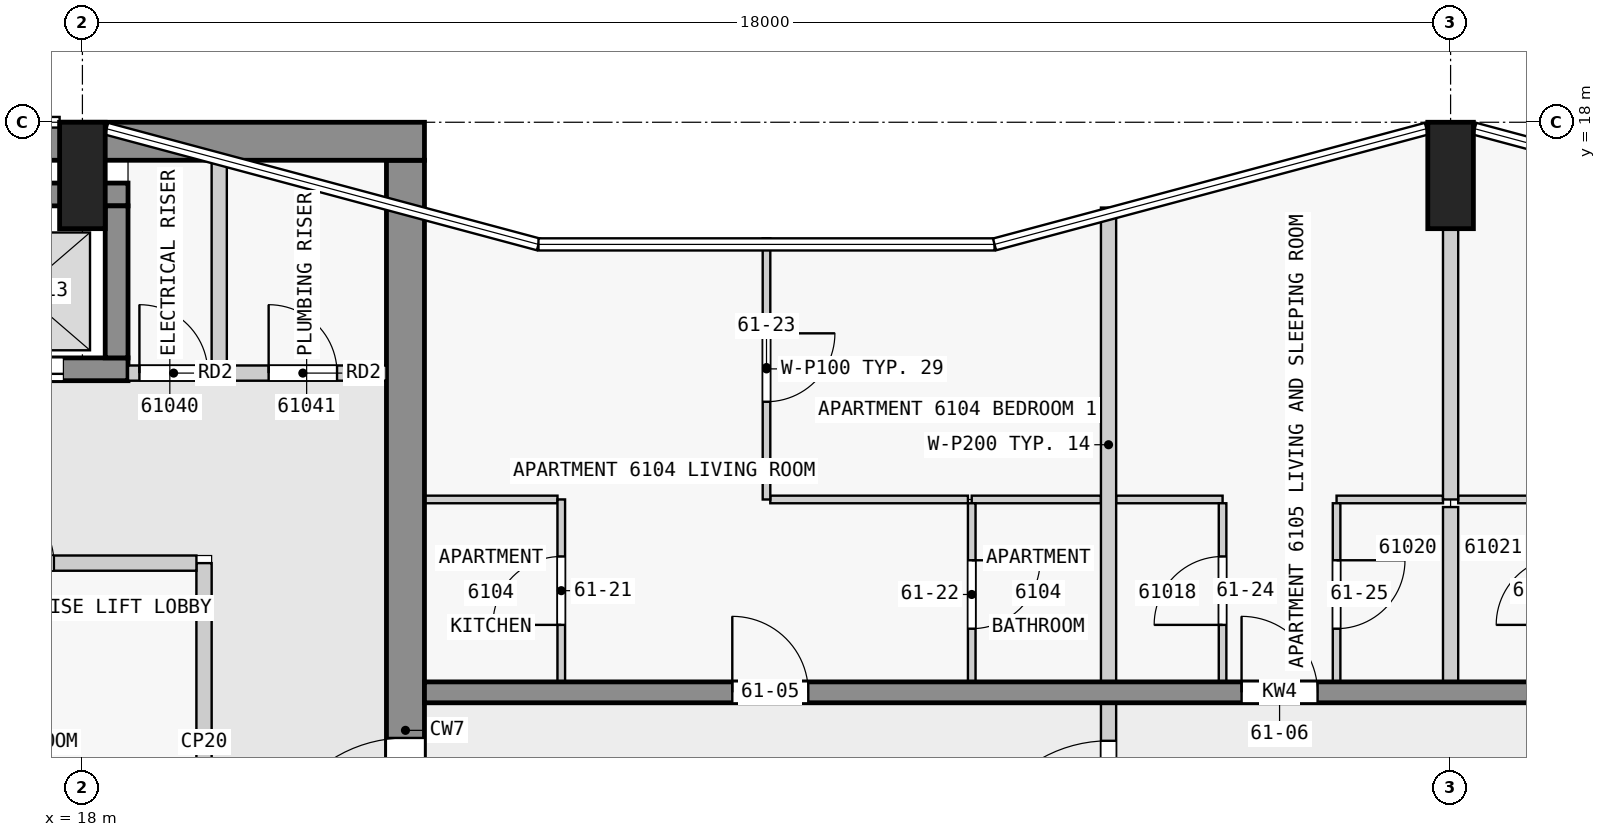
"""IFC4 building model, lengths in metres.
Left out: names, types, materials, properties, quantities, classifications, styles, units other than length and angle.
Written with IfcOpenShell. Run it as: python <this file> out.ifc"""

import sys

from ifc_helpers import new_model, si_unit, direction, frame, frame_2d, origin, origin_2d, place, context, subcontext, project, spatial, rectangle, extrude, element, fill, save


model = new_model("IFC4")
c1 = context("Model", 3, precision=1e-05, world=origin(), true_north=direction((0.0, 1.0)))
c2 = subcontext(c1, "Body", "Model", "MODEL_VIEW")
j1 = project(units=[si_unit("LENGTHUNIT", "METRE"), si_unit("PLANEANGLEUNIT", "RADIAN")], contexts=[c1])
p1 = place(None, origin())
s1 = spatial("IfcSite", under=j1, at=p1, CompositionType="ELEMENT")
p2 = place(p1, origin())
s2 = spatial("IfcBuilding", under=s1, at=p2, CompositionType="ELEMENT")
p3 = place(p2, frame((0.0, 0.0, 232.9)))
s3 = spatial("IfcBuildingStorey", under=s2, at=p3, CompositionType="ELEMENT", Elevation=232.9)
for number, where, z_axis, x_axis in (
    (1, (36.0, 17.3, 0.0), (0.0, 0.0, 1.0), (1.0, 0.0, 0.0)),
    (2, (18.0, 17.3, 0.0), (0.0, 0.0, 1.0), (1.0, 0.0, 0.0)),
):
    element("IfcColumn", number, at=place(p3, frame(where, z_axis=z_axis, x_axis=x_axis)), inside=s3, PredefinedType="COLUMN", context=c2, shape_type="SweptSolid", body=[
        extrude(rectangle(XDim=0.6, YDim=1.4, at=origin_2d()), origin(), (0.0, 0.0, 1.0), 3.5),
    ])
p4 = place(p3, frame((1.8, 17.75, 0.0), z_axis=(0.0, 0.0, 1.0), x_axis=(1.0, 0.0, 0.0)))
e3 = element("IfcWall", 3, at=p4, inside=s3, PredefinedType="SHEAR", context=c2, shape_type="SweptSolid", body=[
    extrude(rectangle(XDim=20.7, YDim=0.5, at=frame_2d((10.35, 0.0))), origin(), (0.0, 0.0, 1.0), 3.2),
])
p5 = place(p3, frame((22.25, 2.5, 0.0), z_axis=(0.0, 0.0, 1.0), x_axis=(0.0, 1.0, 0.0)))
e4 = element("IfcWall", 4, at=p5, inside=s3, PredefinedType="SHEAR", context=c2, shape_type="SweptSolid", body=[
    extrude(rectangle(XDim=15.0, YDim=0.5, at=frame_2d((7.5, 0.0))), origin(), (0.0, 0.0, 1.0), 3.2),
])
p6 = place(p5, frame((5.6, 0.0, 0.0)))
e5 = element("IfcOpeningElement", 5, at=p6, cuts=e4, PredefinedType="OPENING", context=c2, shape_type="SweptSolid", body=[
    extrude(rectangle(XDim=1.8, YDim=2.1, at=frame_2d((0.9, 1.05))), frame((0.0, 0.26, 0.0), z_axis=(0.0, -1.0, 0.0), x_axis=(1.0, 0.0, 0.0)), (0.0, 0.0, 1.0), 0.52),
])
p7 = place(p3, frame((10.8, 17.05, 0.0), z_axis=(0.0, 0.0, 1.0), x_axis=(1.0, 0.0, 0.0)))
e6 = element("IfcWall", 6, at=p7, inside=s3, PredefinedType="SHEAR", context=c2, shape_type="SweptSolid", body=[
    extrude(rectangle(XDim=7.8, YDim=0.3, at=frame_2d((3.9, 0.0))), origin(), (0.0, 0.0, 1.0), 3.2),
])
p8 = place(p3, frame((10.8, 14.75, 0.0), z_axis=(0.0, 0.0, 1.0), x_axis=(1.0, 0.0, 0.0)))
e7 = element("IfcWall", 7, at=p8, inside=s3, PredefinedType="SHEAR", context=c2, shape_type="SweptSolid", body=[
    extrude(rectangle(XDim=7.8, YDim=0.3, at=frame_2d((3.9, 0.0))), origin(), (0.0, 0.0, 1.0), 3.2),
])
p9 = place(p8, frame((0.85, 0.0, 0.0)))
e8 = element("IfcOpeningElement", 8, at=p9, cuts=e7, PredefinedType="OPENING", context=c2, shape_type="SweptSolid", body=[
    extrude(rectangle(XDim=1.1, YDim=2.1, at=frame_2d((0.55, 1.05))), frame((0.0, 0.16, 0.0), z_axis=(0.0, -1.0, 0.0), x_axis=(1.0, 0.0, 0.0)), (0.0, 0.0, 1.0), 0.32),
])
p10 = place(p8, frame((3.35, 0.0, 0.0)))
e9 = element("IfcOpeningElement", 9, at=p10, cuts=e7, PredefinedType="OPENING", context=c2, shape_type="SweptSolid", body=[
    extrude(rectangle(XDim=1.1, YDim=2.1, at=frame_2d((0.55, 1.05))), frame((0.0, 0.16, 0.0), z_axis=(0.0, -1.0, 0.0), x_axis=(1.0, 0.0, 0.0)), (0.0, 0.0, 1.0), 0.32),
])
p11 = place(p8, frame((5.85, 0.0, 0.0)))
e10 = element("IfcOpeningElement", 10, at=p11, cuts=e7, PredefinedType="OPENING", context=c2, shape_type="SweptSolid", body=[
    extrude(rectangle(XDim=1.1, YDim=2.1, at=frame_2d((0.55, 1.05))), frame((0.0, 0.16, 0.0), z_axis=(0.0, -1.0, 0.0), x_axis=(1.0, 0.0, 0.0)), (0.0, 0.0, 1.0), 0.32),
])
p12 = place(p3, frame((18.45, 14.9, 0.0), z_axis=(0.0, 0.0, 1.0), x_axis=(0.0, 1.0, 0.0)))
e11 = element("IfcWall", 11, at=p12, inside=s3, PredefinedType="SHEAR", context=c2, shape_type="SweptSolid", body=[
    extrude(rectangle(XDim=2.0, YDim=0.3, at=frame_2d((1.0, 0.0))), origin(), (0.0, 0.0, 1.0), 3.2),
])
p13 = place(p3, frame((22.5, 10.5, 0.0), z_axis=(0.0, 0.0, 1.0), x_axis=(1.0, 0.0, 0.0)))
e12 = element("IfcWall", 12, at=p13, inside=s3, PredefinedType="SHEAR", context=c2, shape_type="SweptSolid", body=[
    extrude(rectangle(XDim=22.5, YDim=0.275, at=frame_2d((11.25, 0.0))), origin(), (0.0, 0.0, 1.0), 3.2),
])
p14 = place(p13, frame((4.05, 0.0, 0.0)))
e13 = element("IfcOpeningElement", 13, at=p14, cuts=e12, PredefinedType="OPENING", context=c2, shape_type="SweptSolid", body=[
    extrude(rectangle(XDim=1.0, YDim=2.1, at=frame_2d((0.5, 1.05))), frame((0.0, 0.147, 0.0), z_axis=(0.0, -1.0, 0.0), x_axis=(1.0, 0.0, 0.0)), (0.0, 0.0, 1.0), 0.295),
])
p15 = place(p13, frame((10.75, 0.0, 0.0)))
e14 = element("IfcOpeningElement", 14, at=p15, cuts=e12, PredefinedType="OPENING", context=c2, shape_type="SweptSolid", body=[
    extrude(rectangle(XDim=1.0, YDim=2.1, at=frame_2d((0.5, 1.05))), frame((0.0, 0.147, 0.0), z_axis=(0.0, -1.0, 0.0), x_axis=(1.0, 0.0, 0.0)), (0.0, 0.0, 1.0), 0.295),
])
p16 = place(p13, frame((15.25, 0.0, 0.0)))
e15 = element("IfcOpeningElement", 15, at=p16, cuts=e12, PredefinedType="OPENING", context=c2, shape_type="SweptSolid", body=[
    extrude(rectangle(XDim=1.0, YDim=2.1, at=frame_2d((0.5, 1.05))), frame((0.0, 0.147, 0.0), z_axis=(0.0, -1.0, 0.0), x_axis=(1.0, 0.0, 0.0)), (0.0, 0.0, 1.0), 0.295),
])
p17 = place(p13, frame((18.75, 0.0, 0.0)))
e16 = element("IfcOpeningElement", 16, at=p17, cuts=e12, PredefinedType="OPENING", context=c2, shape_type="SweptSolid", body=[
    extrude(rectangle(XDim=0.9, YDim=2.1, at=frame_2d((0.45, 1.05))), frame((0.0, 0.147, 0.0), z_axis=(0.0, -1.0, 0.0), x_axis=(1.0, 0.0, 0.0)), (0.0, 0.0, 1.0), 0.295),
])
p18 = place(p13, frame((20.95, 0.0, 0.0)))
e17 = element("IfcOpeningElement", 17, at=p18, cuts=e12, PredefinedType="OPENING", context=c2, shape_type="SweptSolid", body=[
    extrude(rectangle(XDim=1.0, YDim=2.1, at=frame_2d((0.5, 1.05))), frame((0.0, 0.147, 0.0), z_axis=(0.0, -1.0, 0.0), x_axis=(1.0, 0.0, 0.0)), (0.0, 0.0, 1.0), 0.295),
])
p19 = place(p3, frame((19.6, 7.5, 0.0), z_axis=(0.0, 0.0, 1.0), x_axis=(0.0, 1.0, 0.0)))
e18 = element("IfcWall", 18, at=p19, inside=s3, PredefinedType="PARTITIONING", context=c2, shape_type="SweptSolid", body=[
    extrude(rectangle(XDim=4.7, YDim=0.2, at=frame_2d((2.35, 0.0))), origin(), (0.0, 0.0, 1.0), 3.2),
])
p20 = place(p3, frame((10.9, 12.2, 0.0), z_axis=(0.0, 0.0, 1.0), x_axis=(1.0, 0.0, 0.0)))
e19 = element("IfcWall", 19, at=p20, inside=s3, PredefinedType="PARTITIONING", context=c2, shape_type="SweptSolid", body=[
    extrude(rectangle(XDim=8.6, YDim=0.2, at=frame_2d((4.3, 0.0))), origin(), (0.0, 0.0, 1.0), 3.2),
])
p21 = place(p20, frame((1.425, 0.0, 0.0)))
e20 = element("IfcOpeningElement", 20, at=p21, cuts=e19, PredefinedType="OPENING", context=c2, shape_type="SweptSolid", body=[
    extrude(rectangle(XDim=0.9, YDim=2.1, at=frame_2d((0.45, 1.05))), frame((0.0, 0.11, 0.0), z_axis=(0.0, -1.0, 0.0), x_axis=(1.0, 0.0, 0.0)), (0.0, 0.0, 1.0), 0.22),
])
p22 = place(p20, frame((5.825, 0.0, 0.0)))
e21 = element("IfcOpeningElement", 21, at=p22, cuts=e19, PredefinedType="OPENING", context=c2, shape_type="SweptSolid", body=[
    extrude(rectangle(XDim=0.9, YDim=2.1, at=frame_2d((0.45, 1.05))), frame((0.0, 0.11, 0.0), z_axis=(0.0, -1.0, 0.0), x_axis=(1.0, 0.0, 0.0)), (0.0, 0.0, 1.0), 0.22),
])
p23 = place(p3, frame((18.6, 14.7, 0.0), z_axis=(0.0, 0.0, 1.0), x_axis=(1.0, 0.0, 0.0)))
e22 = element("IfcWall", 22, at=p23, inside=s3, PredefinedType="PARTITIONING", context=c2, shape_type="SweptSolid", body=[
    extrude(rectangle(XDim=3.4, YDim=0.2, at=frame_2d((1.7, 0.0))), origin(), (0.0, 0.0, 1.0), 3.2),
])
p24 = place(p23, frame((0.15, 0.0, 0.0)))
e23 = element("IfcOpeningElement", 23, at=p24, cuts=e22, PredefinedType="OPENING", context=c2, shape_type="SweptSolid", body=[
    extrude(rectangle(XDim=0.9, YDim=2.1, at=frame_2d((0.45, 1.05))), frame((0.0, 0.11, 0.0), z_axis=(0.0, -1.0, 0.0), x_axis=(1.0, 0.0, 0.0)), (0.0, 0.0, 1.0), 0.22),
])
p25 = place(p23, frame((1.85, 0.0, 0.0)))
e24 = element("IfcOpeningElement", 24, at=p25, cuts=e22, PredefinedType="OPENING", context=c2, shape_type="SweptSolid", body=[
    extrude(rectangle(XDim=0.9, YDim=2.1, at=frame_2d((0.45, 1.05))), frame((0.0, 0.11, 0.0), z_axis=(0.0, -1.0, 0.0), x_axis=(1.0, 0.0, 0.0)), (0.0, 0.0, 1.0), 0.22),
])
p26 = place(p3, frame((19.8, 14.8, 0.0), z_axis=(0.0, 0.0, 1.0), x_axis=(0.0, 1.0, 0.0)))
e25 = element("IfcWall", 25, at=p26, inside=s3, PredefinedType="PARTITIONING", context=c2, shape_type="SweptSolid", body=[
    extrude(rectangle(XDim=2.7, YDim=0.2, at=frame_2d((1.35, 0.0))), origin(), (0.0, 0.0, 1.0), 3.2),
])
p27 = place(p3, frame((24.25, 13.038, 0.0), z_axis=(0.0, 0.0, 1.0), x_axis=(-1.0, 0.0, 0.0)))
e26 = element("IfcWall", 26, at=p27, inside=s3, PredefinedType="PARTITIONING", context=c2, shape_type="SweptSolid", body=[
    extrude(rectangle(XDim=1.75, YDim=0.1, at=frame_2d((0.875, 0.0))), origin(), (0.0, 0.0, 1.0), 3.2),
])
p28 = place(p3, frame((31.4, 13.038, 0.0), z_axis=(0.0, 0.0, 1.0), x_axis=(-1.0, 0.0, 0.0)))
e27 = element("IfcWall", 27, at=p28, inside=s3, PredefinedType="PARTITIONING", context=c2, shape_type="SweptSolid", body=[
    extrude(rectangle(XDim=1.7, YDim=0.1, at=frame_2d((0.85, 0.0))), origin(), (0.0, 0.0, 1.0), 3.2),
])
for number, where, z_axis, x_axis in (
    (28, (33.0, 13.038, 0.0), (0.0, 0.0, 1.0), (-1.0, 0.0, 0.0)),
    (29, (35.9, 13.038, 0.0), (0.0, 0.0, 1.0), (-1.0, 0.0, 0.0)),
    (30, (37.5, 13.038, 0.0), (0.0, 0.0, 1.0), (-1.0, 0.0, 0.0)),
):
    element("IfcWall", number, at=place(p3, frame(where, z_axis=z_axis, x_axis=x_axis)), inside=s3, PredefinedType="PARTITIONING", context=c2, shape_type="SweptSolid", body=[
        extrude(rectangle(XDim=1.4, YDim=0.1, at=frame_2d((0.7, 0.0))), origin(), (0.0, 0.0, 1.0), 3.2),
    ])
p29 = place(p3, frame((27.05, 13.038, 0.0), z_axis=(0.0, 0.0, 1.0), x_axis=(1.0, 0.0, 0.0)))
e31 = element("IfcWall", 31, at=p29, inside=s3, PredefinedType="PARTITIONING", context=c2, shape_type="SweptSolid", body=[
    extrude(rectangle(XDim=2.6, YDim=0.1, at=frame_2d((1.3, 0.0))), origin(), (0.0, 0.0, 1.0), 3.2),
])
p30 = place(p3, frame((24.3, 10.637, 0.0), z_axis=(0.0, 0.0, 1.0), x_axis=(0.0, 1.0, 0.0)))
e32 = element("IfcWall", 32, at=p30, inside=s3, PredefinedType="PARTITIONING", context=c2, shape_type="SweptSolid", body=[
    extrude(rectangle(XDim=2.4, YDim=0.1, at=frame_2d((1.2, 0.0))), origin(), (0.0, 0.0, 1.0), 3.2),
])
p31 = place(p30, frame((0.75, 0.0, 0.0)))
e33 = element("IfcOpeningElement", 33, at=p31, cuts=e32, PredefinedType="OPENING", context=c2, shape_type="SweptSolid", body=[
    extrude(rectangle(XDim=0.9, YDim=2.1, at=frame_2d((0.45, 1.05))), frame((0.0, 0.06, 0.0), z_axis=(0.0, -1.0, 0.0), x_axis=(1.0, 0.0, 0.0)), (0.0, 0.0, 1.0), 0.12),
])
p32 = place(p3, frame((27.0, 16.473, 0.0), z_axis=(0.0, 0.0, 1.0), x_axis=(0.0, -1.0, 0.0)))
e34 = element("IfcWall", 34, at=p32, inside=s3, PredefinedType="PARTITIONING", context=c2, shape_type="SweptSolid", body=[
    extrude(rectangle(XDim=3.436, YDim=0.1, at=frame_2d((1.718, 0.0))), origin(), (0.0, 0.0, 1.0), 3.2),
])
p33 = place(p32, frame((1.25, 0.0, 0.0)))
e35 = element("IfcOpeningElement", 35, at=p33, cuts=e34, PredefinedType="OPENING", context=c2, shape_type="SweptSolid", body=[
    extrude(rectangle(XDim=0.9, YDim=2.1, at=frame_2d((0.45, 1.05))), frame((0.0, 0.06, 0.0), z_axis=(0.0, -1.0, 0.0), x_axis=(1.0, 0.0, 0.0)), (0.0, 0.0, 1.0), 0.12),
])
p34 = place(p3, frame((29.7, 12.988, 0.0), z_axis=(0.0, 0.0, 1.0), x_axis=(0.0, -1.0, 0.0)))
e36 = element("IfcWall", 36, at=p34, inside=s3, PredefinedType="PARTITIONING", context=c2, shape_type="SweptSolid", body=[
    extrude(rectangle(XDim=2.35, YDim=0.1, at=frame_2d((1.175, 0.0))), origin(), (0.0, 0.0, 1.0), 3.2),
])
p35 = place(p34, frame((0.75, 0.0, 0.0)))
e37 = element("IfcOpeningElement", 37, at=p35, cuts=e36, PredefinedType="OPENING", context=c2, shape_type="SweptSolid", body=[
    extrude(rectangle(XDim=0.9, YDim=2.1, at=frame_2d((0.45, 1.05))), frame((0.0, 0.06, 0.0), z_axis=(0.0, -1.0, 0.0), x_axis=(1.0, 0.0, 0.0)), (0.0, 0.0, 1.0), 0.12),
])
p36 = place(p3, frame((31.5, 10.637, 0.0), z_axis=(0.0, 0.0, 1.0), x_axis=(0.0, 1.0, 0.0)))
e38 = element("IfcWall", 38, at=p36, inside=s3, PredefinedType="PARTITIONING", context=c2, shape_type="SweptSolid", body=[
    extrude(rectangle(XDim=6.24, YDim=0.2, at=frame_2d((3.12, 0.0))), origin(), (0.0, 0.0, 1.0), 3.2),
])
p37 = place(p3, frame((33.0, 10.637, 0.0), z_axis=(0.0, 0.0, 1.0), x_axis=(0.0, 1.0, 0.0)))
e39 = element("IfcWall", 39, at=p37, inside=s3, PredefinedType="PARTITIONING", context=c2, shape_type="SweptSolid", body=[
    extrude(rectangle(XDim=2.35, YDim=0.1, at=frame_2d((1.175, 0.0))), origin(), (0.0, 0.0, 1.0), 3.2),
])
p38 = place(p37, frame((0.75, 0.0, 0.0)))
e40 = element("IfcOpeningElement", 40, at=p38, cuts=e39, PredefinedType="OPENING", context=c2, shape_type="SweptSolid", body=[
    extrude(rectangle(XDim=0.9, YDim=2.1, at=frame_2d((0.45, 1.05))), frame((0.0, 0.06, 0.0), z_axis=(0.0, -1.0, 0.0), x_axis=(1.0, 0.0, 0.0)), (0.0, 0.0, 1.0), 0.12),
])
p39 = place(p3, frame((34.5, 12.988, 0.0), z_axis=(0.0, 0.0, 1.0), x_axis=(0.0, -1.0, 0.0)))
e41 = element("IfcWall", 41, at=p39, inside=s3, PredefinedType="PARTITIONING", context=c2, shape_type="SweptSolid", body=[
    extrude(rectangle(XDim=2.35, YDim=0.1, at=frame_2d((1.175, 0.0))), origin(), (0.0, 0.0, 1.0), 3.2),
])
p40 = place(p39, frame((0.75, 0.0, 0.0)))
e42 = element("IfcOpeningElement", 42, at=p40, cuts=e41, PredefinedType="OPENING", context=c2, shape_type="SweptSolid", body=[
    extrude(rectangle(XDim=0.9, YDim=2.1, at=frame_2d((0.45, 1.05))), frame((0.0, 0.06, 0.0), z_axis=(0.0, -1.0, 0.0), x_axis=(1.0, 0.0, 0.0)), (0.0, 0.0, 1.0), 0.12),
])
p41 = place(p3, frame((36.0, 16.6, 0.0), z_axis=(0.0, 0.0, 1.0), x_axis=(0.0, -1.0, 0.0)))
e43 = element("IfcWall", 43, at=p41, inside=s3, PredefinedType="PARTITIONING", context=c2, shape_type="SweptSolid", body=[
    extrude(rectangle(XDim=3.562, YDim=0.2, at=frame_2d((1.781, 0.0))), origin(), (0.0, 0.0, 1.0), 3.2),
])
p42 = place(p3, frame((36.0, 10.637, 0.0), z_axis=(0.0, 0.0, 1.0), x_axis=(0.0, 1.0, 0.0)))
e44 = element("IfcWall", 44, at=p42, inside=s3, PredefinedType="PARTITIONING", context=c2, shape_type="SweptSolid", body=[
    extrude(rectangle(XDim=2.3, YDim=0.2, at=frame_2d((1.15, 0.0))), origin(), (0.0, 0.0, 1.0), 3.2),
])
p43 = place(p3, frame((31.5, 7.462, 0.0), z_axis=(0.0, 0.0, 1.0), x_axis=(0.0, 1.0, 0.0)))
e45 = element("IfcWall", 45, at=p43, inside=s3, PredefinedType="PARTITIONING", context=c2, shape_type="SweptSolid", body=[
    extrude(rectangle(XDim=3.075, YDim=0.2, at=frame_2d((1.538, 0.0))), origin(), (0.0, 0.0, 1.0), 3.2),
])
p44 = place(p43, frame((0.6, 0.0, 0.0)))
e46 = element("IfcOpeningElement", 46, at=p44, cuts=e45, PredefinedType="OPENING", context=c2, shape_type="SweptSolid", body=[
    extrude(rectangle(XDim=1.8, YDim=2.1, at=frame_2d((0.9, 1.05))), frame((0.0, 0.11, 0.0), z_axis=(0.0, -1.0, 0.0), x_axis=(1.0, 0.0, 0.0)), (0.0, 0.0, 1.0), 0.22),
])
p45 = place(p22, origin())
e47 = element("IfcDoor", 47, at=p45, inside=s3, OperationType="SINGLE_SWING_LEFT", PredefinedType="DOOR", context=c2, shape_type="SweptSolid", body=[
    extrude(rectangle(XDim=0.9, YDim=2.1, at=frame_2d((0.45, 1.05))), frame((0.0, 0.025, 0.0), z_axis=(0.0, -1.0, 0.0), x_axis=(1.0, 0.0, 0.0)), (0.0, 0.0, 1.0), 0.05),
])
fill(e21, e47)
p46 = place(p11, origin())
e48 = element("IfcDoor", 48, at=p46, inside=s3, OperationType="DOUBLE_DOOR_SLIDING", PredefinedType="DOOR", context=c2, shape_type="SweptSolid", body=[
    extrude(rectangle(XDim=1.1, YDim=2.1, at=frame_2d((0.55, 1.05))), frame((0.0, 0.025, 0.0), z_axis=(0.0, -1.0, 0.0), x_axis=(1.0, 0.0, 0.0)), (0.0, 0.0, 1.0), 0.05),
])
fill(e10, e48)
p47 = place(p6, origin())
e49 = element("IfcDoor", 49, at=p47, inside=s3, OperationType="DOUBLE_DOOR_SINGLE_SWING", PredefinedType="DOOR", context=c2, shape_type="SweptSolid", body=[
    extrude(rectangle(XDim=1.8, YDim=2.1, at=frame_2d((0.9, 1.05))), frame((0.0, 0.025, 0.0), z_axis=(0.0, -1.0, 0.0), x_axis=(1.0, 0.0, 0.0)), (0.0, 0.0, 1.0), 0.05),
])
fill(e5, e49)
p48 = place(p24, origin())
e50 = element("IfcDoor", 50, at=p48, inside=s3, OperationType="SINGLE_SWING_LEFT", PredefinedType="DOOR", context=c2, shape_type="SweptSolid", body=[
    extrude(rectangle(XDim=0.9, YDim=2.1, at=frame_2d((0.45, 1.05))), frame((0.0, 0.025, 0.0), z_axis=(0.0, -1.0, 0.0), x_axis=(1.0, 0.0, 0.0)), (0.0, 0.0, 1.0), 0.05),
])
fill(e23, e50)
p49 = place(p25, origin())
e51 = element("IfcDoor", 51, at=p49, inside=s3, OperationType="SINGLE_SWING_LEFT", PredefinedType="DOOR", context=c2, shape_type="SweptSolid", body=[
    extrude(rectangle(XDim=0.9, YDim=2.1, at=frame_2d((0.45, 1.05))), frame((0.0, 0.025, 0.0), z_axis=(0.0, -1.0, 0.0), x_axis=(1.0, 0.0, 0.0)), (0.0, 0.0, 1.0), 0.05),
])
fill(e24, e51)
p50 = place(p14, origin())
e52 = element("IfcDoor", 52, at=p50, inside=s3, OperationType="SINGLE_SWING_LEFT", PredefinedType="DOOR", context=c2, shape_type="SweptSolid", body=[
    extrude(rectangle(XDim=1.0, YDim=2.1, at=frame_2d((0.5, 1.05))), frame((0.0, 0.025, 0.0), z_axis=(0.0, -1.0, 0.0), x_axis=(1.0, 0.0, 0.0)), (0.0, 0.0, 1.0), 0.05),
])
fill(e13, e52)
p51 = place(p15, origin())
e53 = element("IfcDoor", 53, at=p51, inside=s3, OperationType="SINGLE_SWING_LEFT", PredefinedType="DOOR", context=c2, shape_type="SweptSolid", body=[
    extrude(rectangle(XDim=1.0, YDim=2.1, at=frame_2d((0.5, 1.05))), frame((0.0, 0.025, 0.0), z_axis=(0.0, -1.0, 0.0), x_axis=(1.0, 0.0, 0.0)), (0.0, 0.0, 1.0), 0.05),
])
fill(e14, e53)
p52 = place(p44, origin())
e54 = element("IfcDoor", 54, at=p52, inside=s3, OperationType="SINGLE_SWING_LEFT", PredefinedType="DOOR", context=c2, shape_type="SweptSolid", body=[
    extrude(rectangle(XDim=1.8, YDim=2.1, at=frame_2d((0.9, 1.05))), frame((0.0, 0.025, 0.0), z_axis=(0.0, -1.0, 0.0), x_axis=(1.0, 0.0, 0.0)), (0.0, 0.0, 1.0), 0.05),
])
fill(e46, e54)
p53 = place(p31, origin())
e55 = element("IfcDoor", 55, at=p53, inside=s3, OperationType="SINGLE_SWING_LEFT", PredefinedType="DOOR", context=c2, shape_type="SweptSolid", body=[
    extrude(rectangle(XDim=0.9, YDim=2.1, at=frame_2d((0.45, 1.05))), frame((0.0, 0.025, 0.0), z_axis=(0.0, -1.0, 0.0), x_axis=(1.0, 0.0, 0.0)), (0.0, 0.0, 1.0), 0.05),
])
fill(e33, e55)
p54 = place(p35, origin())
e56 = element("IfcDoor", 56, at=p54, inside=s3, OperationType="SINGLE_SWING_RIGHT", PredefinedType="DOOR", context=c2, shape_type="SweptSolid", body=[
    extrude(rectangle(XDim=0.9, YDim=2.1, at=frame_2d((0.45, 1.05))), frame((0.0, 0.025, 0.0), z_axis=(0.0, -1.0, 0.0), x_axis=(1.0, 0.0, 0.0)), (0.0, 0.0, 1.0), 0.05),
])
fill(e37, e56)
p55 = place(p33, origin())
e57 = element("IfcDoor", 57, at=p55, inside=s3, OperationType="SINGLE_SWING_LEFT", PredefinedType="DOOR", context=c2, shape_type="SweptSolid", body=[
    extrude(rectangle(XDim=0.9, YDim=2.1, at=frame_2d((0.45, 1.05))), frame((0.0, 0.025, 0.0), z_axis=(0.0, -1.0, 0.0), x_axis=(1.0, 0.0, 0.0)), (0.0, 0.0, 1.0), 0.05),
])
fill(e35, e57)
p56 = place(p38, origin())
e58 = element("IfcDoor", 58, at=p56, inside=s3, OperationType="SINGLE_SWING_RIGHT", PredefinedType="DOOR", context=c2, shape_type="SweptSolid", body=[
    extrude(rectangle(XDim=0.9, YDim=2.1, at=frame_2d((0.45, 1.05))), frame((0.0, 0.025, 0.0), z_axis=(0.0, -1.0, 0.0), x_axis=(1.0, 0.0, 0.0)), (0.0, 0.0, 1.0), 0.05),
])
fill(e40, e58)
p57 = place(p40, origin())
e59 = element("IfcDoor", 59, at=p57, inside=s3, OperationType="SINGLE_SWING_RIGHT", PredefinedType="DOOR", context=c2, shape_type="SweptSolid", body=[
    extrude(rectangle(XDim=0.9, YDim=2.1, at=frame_2d((0.45, 1.05))), frame((0.0, 0.025, 0.0), z_axis=(0.0, -1.0, 0.0), x_axis=(1.0, 0.0, 0.0)), (0.0, 0.0, 1.0), 0.05),
])
fill(e42, e59)
save(model, sys.argv[1])
